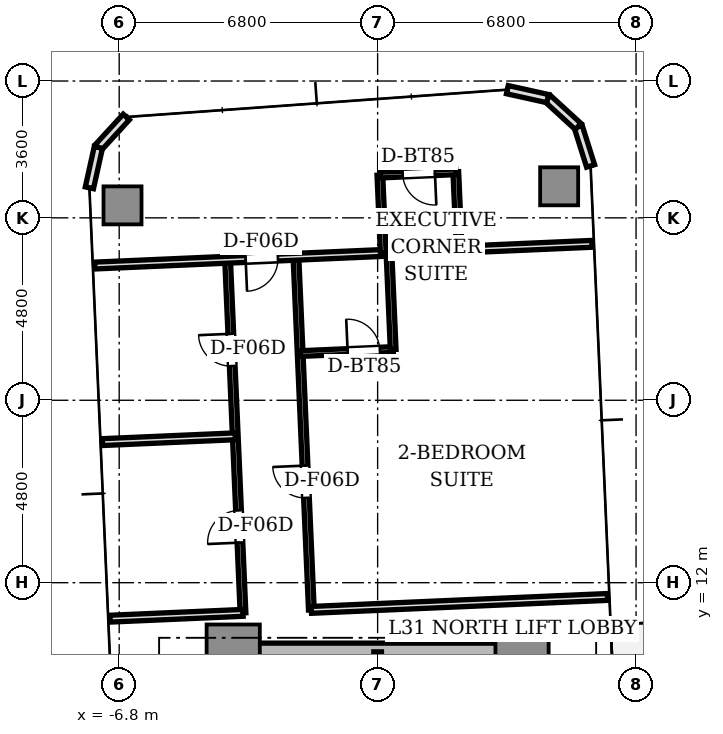
"""IFC4 building model, lengths in metres.
Left out: names, types, materials, properties, quantities, classifications, styles, units other than length and angle.
Written with IfcOpenShell. Run it as: python <this file> out.ifc"""

import sys

from ifc_helpers import new_model, si_unit, direction, frame, frame_2d, origin, origin_2d, place, context, subcontext, project, spatial, rectangle, extrude, source, transform, mapped, element, fill, save


model = new_model("IFC4")
c1 = context("Model", 3, precision=1e-05, world=origin(), true_north=direction((0.0, 1.0)))
c2 = subcontext(c1, "Body", "Model", "MODEL_VIEW")
j1 = project(units=[si_unit("LENGTHUNIT", "METRE"), si_unit("PLANEANGLEUNIT", "RADIAN")], contexts=[c1])
p1 = place(None, origin())
s1 = spatial("IfcSite", under=j1, at=p1, CompositionType="ELEMENT")
p2 = place(p1, origin())
s2 = spatial("IfcBuilding", under=s1, at=p2, CompositionType="ELEMENT")
p3 = place(p2, frame((0.0, 0.0, 114.8)))
s3 = spatial("IfcBuildingStorey", under=s2, at=p3, CompositionType="ELEMENT", Elevation=114.8)
p4 = place(p3, frame((-3.55, 10.2, 0.0), z_axis=(0.0, 0.0, 1.0), x_axis=(1.0, 0.0, 0.0)))
e1 = element("IfcWall", 1, at=p4, inside=s3, PredefinedType="SHEAR", context=c2, shape_type="SweptSolid", body=[
    extrude(rectangle(XDim=7.1, YDim=0.42, at=frame_2d((3.55, 0.0))), origin(), (0.0, 0.0, 1.0), 3.11),
])
m1 = source(origin(), c2, "Body", "SweptSolid", [
    extrude(rectangle(XDim=1.4, YDim=1.4, at=origin_2d()), origin(), (0.0, 0.0, 1.0), 3.11),
])
for number, where, z_axis, x_axis in (
    (2, (-3.8, 10.2, 0.0), (0.0, 0.0, 1.0), (1.0, 0.0, 0.0)),
    (3, (3.8, 10.2, 0.0), (0.0, 0.0, 1.0), (1.0, 0.0, 0.0)),
):
    element("IfcColumn", number, at=place(p3, frame(where, z_axis=z_axis, x_axis=x_axis)), inside=s3, PredefinedType="COLUMN", context=c2, shape_type="MappedRepresentation", body=[
        mapped(m1, transform((0.0, 0.0, 0.0), scale=1.0)),
    ])
m2 = source(origin(), c2, "Body", "SweptSolid", [
    extrude(rectangle(XDim=1.0, YDim=1.0, at=origin_2d()), origin(), (0.0, 0.0, 1.0), 3.11),
])
for number, where, z_axis, x_axis in (
    (4, (4.776, 22.43, 0.0), (0.0, 0.0, 1.0), (1.0, 0.0, 0.0)),
    (5, (-6.713, 21.928, 0.0), (0.0, 0.0, 1.0), (1.0, 0.0, 0.0)),
):
    element("IfcColumn", number, at=place(p3, frame(where, z_axis=z_axis, x_axis=x_axis)), inside=s3, PredefinedType="COLUMN", context=c2, shape_type="MappedRepresentation", body=[
        mapped(m2, transform((0.0, 0.0, 0.0), scale=1.0)),
    ])
p5 = place(p3, frame((5.604, 22.966, 0.0), z_axis=(0.0, 0.0, 1.0), x_axis=(-0.300755105707, 0.953701403161, 0.0)))
e6 = element("IfcWall", 6, at=p5, inside=s3, PredefinedType="STANDARD", context=c2, shape_type="SweptSolid", body=[
    extrude(rectangle(XDim=1.087, YDim=0.22, at=frame_2d((0.543, 0.0))), origin(), (0.0, 0.0, 1.0), 3.11),
])
p6 = place(p3, frame((5.277, 24.003, 0.0), z_axis=(0.0, 0.0, 1.0), x_axis=(-0.737312600672, 0.675551721847, 0.0)))
e7 = element("IfcWall", 7, at=p6, inside=s3, PredefinedType="STANDARD", context=c2, shape_type="SweptSolid", body=[
    extrude(rectangle(XDim=1.087, YDim=0.22, at=frame_2d((0.543, 0.0))), origin(), (0.0, 0.0, 1.0), 3.11),
])
for number, where, z_axis, x_axis in (
    (8, (4.475, 24.737, 0.0), (0.0, 0.0, 1.0), (-0.976, 0.217, 0.0)),
    (9, (-6.614, 24.253, 0.0), (0.0, 0.0, 1.0), (-0.676, -0.737, 0.0)),
):
    element("IfcWall", number, at=place(p3, frame(where, z_axis=z_axis, x_axis=x_axis)), inside=s3, PredefinedType="STANDARD", context=c2, shape_type="SweptSolid", body=[
        extrude(rectangle(XDim=1.087, YDim=0.22, at=frame_2d((0.543, 0.0))), origin(), (0.0, 0.0, 1.0), 3.11),
    ])
p7 = place(p3, frame((-7.349, 23.452, 0.0), z_axis=(0.0, 0.0, 1.0), x_axis=(-0.216454939174, -0.976292609471, 0.0)))
e10 = element("IfcWall", 10, at=p7, inside=s3, PredefinedType="STANDARD", context=c2, shape_type="SweptSolid", body=[
    extrude(rectangle(XDim=1.087, YDim=0.22, at=frame_2d((0.544, 0.0))), origin(), (0.0, 0.0, 1.0), 3.11),
])
p8 = place(p3, frame((0.0, 2.5, 0.0), z_axis=(0.0, 0.0, 1.0), x_axis=(0.0, 1.0, 0.0)))
e11 = element("IfcWall", 11, at=p8, inside=s3, PredefinedType="SOLIDWALL", context=c2, shape_type="SweptSolid", body=[
    extrude(rectangle(XDim=7.68, YDim=0.2, at=frame_2d((3.84, 0.0))), origin(), (0.0, 0.0, 1.0), 3.11),
])
p9 = place(p8, frame((6.36, 0.0, 0.0)))
e12 = element("IfcOpeningElement", 12, at=p9, cuts=e11, PredefinedType="OPENING", context=c2, shape_type="SweptSolid", body=[
    extrude(rectangle(XDim=1.1, YDim=2.15, at=frame_2d((0.55, 1.075))), frame((0.0, 0.11, 0.0), z_axis=(0.0, -1.0, 0.0), x_axis=(1.0, 0.0, 0.0)), (0.0, 0.0, 1.0), 0.22),
])
p10 = place(p3, frame((-3.542, 11.206, 0.0), z_axis=(0.0, 0.0, 1.0), x_axis=(-0.043604692074, 0.999048863084, 0.0)))
e13 = element("IfcWall", 13, at=p10, inside=s3, PredefinedType="PARTITIONING", context=c2, shape_type="SweptSolid", body=[
    extrude(rectangle(XDim=9.3, YDim=0.15, at=frame_2d((4.65, 0.0))), origin(), (0.0, 0.0, 1.0), 2.66),
])
p11 = place(p10, frame((1.85, 0.0, 0.0)))
e14 = element("IfcOpeningElement", 14, at=p11, cuts=e13, PredefinedType="OPENING", context=c2, shape_type="SweptSolid", body=[
    extrude(rectangle(XDim=0.85, YDim=2.1, at=frame_2d((0.425, 1.05))), frame((0.0, 0.085, 0.0), z_axis=(0.0, -1.0, 0.0), x_axis=(1.0, 0.0, 0.0)), (0.0, 0.0, 1.0), 0.17),
])
p12 = place(p10, frame((6.5, 0.0, 0.0)))
e15 = element("IfcOpeningElement", 15, at=p12, cuts=e13, PredefinedType="OPENING", context=c2, shape_type="SweptSolid", body=[
    extrude(rectangle(XDim=0.85, YDim=2.1, at=frame_2d((0.425, 1.05))), frame((0.0, 0.085, 0.0), z_axis=(0.0, -1.0, 0.0), x_axis=(1.0, 0.0, 0.0)), (0.0, 0.0, 1.0), 0.17),
])
p13 = place(p3, frame((-1.744, 11.285, 0.0), z_axis=(0.0, 0.0, 1.0), x_axis=(-0.043630894187, 0.999047719117, 0.0)))
e16 = element("IfcWall", 16, at=p13, inside=s3, PredefinedType="PARTITIONING", context=c2, shape_type="SweptSolid", body=[
    extrude(rectangle(XDim=9.3, YDim=0.15, at=frame_2d((4.65, 0.0))), origin(), (0.0, 0.0, 1.0), 2.66),
])
p14 = place(p13, frame((2.95, 0.0, 0.0)))
e17 = element("IfcOpeningElement", 17, at=p14, cuts=e16, PredefinedType="OPENING", context=c2, shape_type="SweptSolid", body=[
    extrude(rectangle(XDim=0.85, YDim=2.1, at=frame_2d((0.425, 1.05))), frame((0.0, 0.085, 0.0), z_axis=(0.0, -1.0, 0.0), x_axis=(1.0, 0.0, 0.0)), (0.0, 0.0, 1.0), 0.17),
])
p15 = place(p3, frame((-3.542, 11.206, 0.0), z_axis=(0.0, 0.0, 1.0), x_axis=(-0.999046129111, -0.04366728647, 0.0)))
e18 = element("IfcWall", 18, at=p15, inside=s3, PredefinedType="PARTITIONING", context=c2, shape_type="SweptSolid", body=[
    extrude(rectangle(XDim=3.5, YDim=0.18, at=frame_2d((1.75, 0.0))), origin(), (0.0, 0.0, 1.0), 2.66),
])
p16 = place(p3, frame((6.049, 11.625, 0.0), z_axis=(0.0, 0.0, 1.0), x_axis=(-0.999047634936, -0.043632821702, 0.0)))
e19 = element("IfcWall", 19, at=p16, inside=s3, PredefinedType="PARTITIONING", context=c2, shape_type="SweptSolid", body=[
    extrude(rectangle(XDim=7.8, YDim=0.18, at=frame_2d((3.9, 0.0))), origin(), (0.0, 0.0, 1.0), 2.66),
])
p17 = place(p3, frame((-3.745, 15.852, 0.0), z_axis=(0.0, 0.0, 1.0), x_axis=(-0.999049169846, -0.043597663116, 0.0)))
e20 = element("IfcWall", 20, at=p17, inside=s3, PredefinedType="PARTITIONING", context=c2, shape_type="SweptSolid", body=[
    extrude(rectangle(XDim=3.5, YDim=0.18, at=frame_2d((1.75, 0.0))), origin(), (0.0, 0.0, 1.0), 2.66),
])
p18 = place(p3, frame((-2.038, 18.028, 0.0), z_axis=(0.0, 0.0, 1.0), x_axis=(0.999051263243, 0.043549666039, 0.0)))
e21 = element("IfcWall", 21, at=p18, inside=s3, PredefinedType="PARTITIONING", context=c2, shape_type="SweptSolid", body=[
    extrude(rectangle(XDim=2.45, YDim=0.15, at=frame_2d((1.225, 0.0))), origin(), (0.0, 0.0, 1.0), 2.66),
])
p19 = place(p18, frame((1.25, 0.0, 0.0)))
e22 = element("IfcOpeningElement", 22, at=p19, cuts=e21, PredefinedType="OPENING", context=c2, shape_type="SweptSolid", body=[
    extrude(rectangle(XDim=0.85, YDim=2.1, at=frame_2d((0.425, 1.05))), frame((0.0, 0.085, 0.0), z_axis=(0.0, -1.0, 0.0), x_axis=(1.0, 0.0, 0.0)), (0.0, 0.0, 1.0), 0.17),
])
p20 = place(p3, frame((0.409, 18.135, 0.0), z_axis=(0.0, 0.0, 1.0), x_axis=(-0.043561867058, 0.999050731314, 0.0)))
e23 = element("IfcWall", 23, at=p20, inside=s3, PredefinedType="PARTITIONING", context=c2, shape_type="SweptSolid", body=[
    extrude(rectangle(XDim=2.55, YDim=0.15, at=frame_2d((1.275, 0.0))), origin(), (0.0, 0.0, 1.0), 2.66),
])
p21 = place(p3, frame((5.643, 20.916, 0.0), z_axis=(0.0, 0.0, 1.0), x_axis=(-0.999047841598, -0.043628089563, 0.0)))
e24 = element("IfcWall", 24, at=p21, inside=s3, PredefinedType="PARTITIONING", context=c2, shape_type="SweptSolid", body=[
    extrude(rectangle(XDim=13.1, YDim=0.18, at=frame_2d((6.55, 0.0))), origin(), (0.0, 0.0, 1.0), 2.66),
])
p22 = place(p21, frame((8.275, 0.0, 0.0)))
e25 = element("IfcOpeningElement", 25, at=p22, cuts=e24, PredefinedType="OPENING", context=c2, shape_type="SweptSolid", body=[
    extrude(rectangle(XDim=0.85, YDim=2.1, at=frame_2d((0.425, 1.05))), frame((0.0, 0.1, 0.0), z_axis=(0.0, -1.0, 0.0), x_axis=(1.0, 0.0, 0.0)), (0.0, 0.0, 1.0), 0.2),
])
p23 = place(p3, frame((0.148, 20.676, 0.0), z_axis=(0.0, 0.0, 1.0), x_axis=(-0.043587097972, 0.999049630844, 0.0)))
e26 = element("IfcWall", 26, at=p23, inside=s3, PredefinedType="PARTITIONING", context=c2, shape_type="SweptSolid", body=[
    extrude(rectangle(XDim=2.05, YDim=0.15, at=frame_2d((1.025, 0.0))), origin(), (0.0, 0.0, 1.0), 2.66),
])
p24 = place(p3, frame((2.146, 20.763, 0.0), z_axis=(0.0, 0.0, 1.0), x_axis=(-0.043711161805, 0.9990442104, 0.0)))
e27 = element("IfcWall", 27, at=p24, inside=s3, PredefinedType="PARTITIONING", context=c2, shape_type="SweptSolid", body=[
    extrude(rectangle(XDim=2.05, YDim=0.15, at=frame_2d((1.025, 0.0))), origin(), (0.0, 0.0, 1.0), 2.66),
])
p25 = place(p3, frame((2.057, 22.811, 0.0), z_axis=(0.0, 0.0, 1.0), x_axis=(-0.999049929275, -0.043580257179, 0.0)))
e28 = element("IfcWall", 28, at=p25, inside=s3, PredefinedType="PARTITIONING", context=c2, shape_type="SweptSolid", body=[
    extrude(rectangle(XDim=2.0, YDim=0.15, at=frame_2d((1.0, 0.0))), origin(), (0.0, 0.0, 1.0), 2.66),
])
p26 = place(p25, frame((0.55, 0.0, 0.0)))
e29 = element("IfcOpeningElement", 29, at=p26, cuts=e28, PredefinedType="OPENING", context=c2, shape_type="SweptSolid", body=[
    extrude(rectangle(XDim=0.85, YDim=2.1, at=frame_2d((0.425, 1.05))), frame((0.0, 0.085, 0.0), z_axis=(0.0, -1.0, 0.0), x_axis=(1.0, 0.0, 0.0)), (0.0, 0.0, 1.0), 0.17),
])
m3 = source(origin(), c2, "Body", "SweptSolid", [
    extrude(rectangle(XDim=0.85, YDim=0.05, at=origin_2d()), origin(), (0.0, 0.0, 1.0), 2.1),
])
p27 = place(p11, frame((0.425, 0.0, 0.0)))
e30 = element("IfcDoor", 30, at=p27, inside=s3, OperationType="SINGLE_SWING_LEFT", PredefinedType="DOOR", context=c2, shape_type="MappedRepresentation", body=[
    mapped(m3, transform((0.0, 0.0, 0.0), scale=1.0)),
])
fill(e14, e30)
p28 = place(p12, frame((0.425, 0.0, 0.0)))
e31 = element("IfcDoor", 31, at=p28, inside=s3, OperationType="SINGLE_SWING_RIGHT", PredefinedType="DOOR", context=c2, shape_type="MappedRepresentation", body=[
    mapped(m3, transform((0.0, 0.0, 0.0), scale=1.0)),
])
fill(e15, e31)
p29 = place(p19, frame((0.425, 0.0, 0.0)))
e32 = element("IfcDoor", 32, at=p29, inside=s3, OperationType="SINGLE_SWING_LEFT", PredefinedType="DOOR", context=c2, shape_type="MappedRepresentation", body=[
    mapped(m3, transform((0.0, 0.0, 0.0), scale=1.0)),
])
fill(e22, e32)
p30 = place(p14, frame((0.425, 0.0, 0.0)))
e33 = element("IfcDoor", 33, at=p30, inside=s3, OperationType="SINGLE_SWING_RIGHT", PredefinedType="DOOR", context=c2, shape_type="MappedRepresentation", body=[
    mapped(m3, transform((0.0, 0.0, 0.0), scale=1.0)),
])
fill(e17, e33)
p31 = place(p26, frame((0.425, 0.0, 0.0)))
e34 = element("IfcDoor", 34, at=p31, inside=s3, OperationType="SINGLE_SWING_LEFT", PredefinedType="DOOR", context=c2, shape_type="MappedRepresentation", body=[
    mapped(m3, transform((0.0, 0.0, 0.0), scale=1.0)),
])
fill(e29, e34)
p32 = place(p22, frame((0.425, 0.0, 0.0)))
e35 = element("IfcDoor", 35, at=p32, inside=s3, OperationType="SINGLE_SWING_RIGHT", PredefinedType="DOOR", context=c2, shape_type="MappedRepresentation", body=[
    mapped(m3, transform((0.0, 0.0, 0.0), scale=1.0)),
])
fill(e25, e35)
save(model, sys.argv[1])
